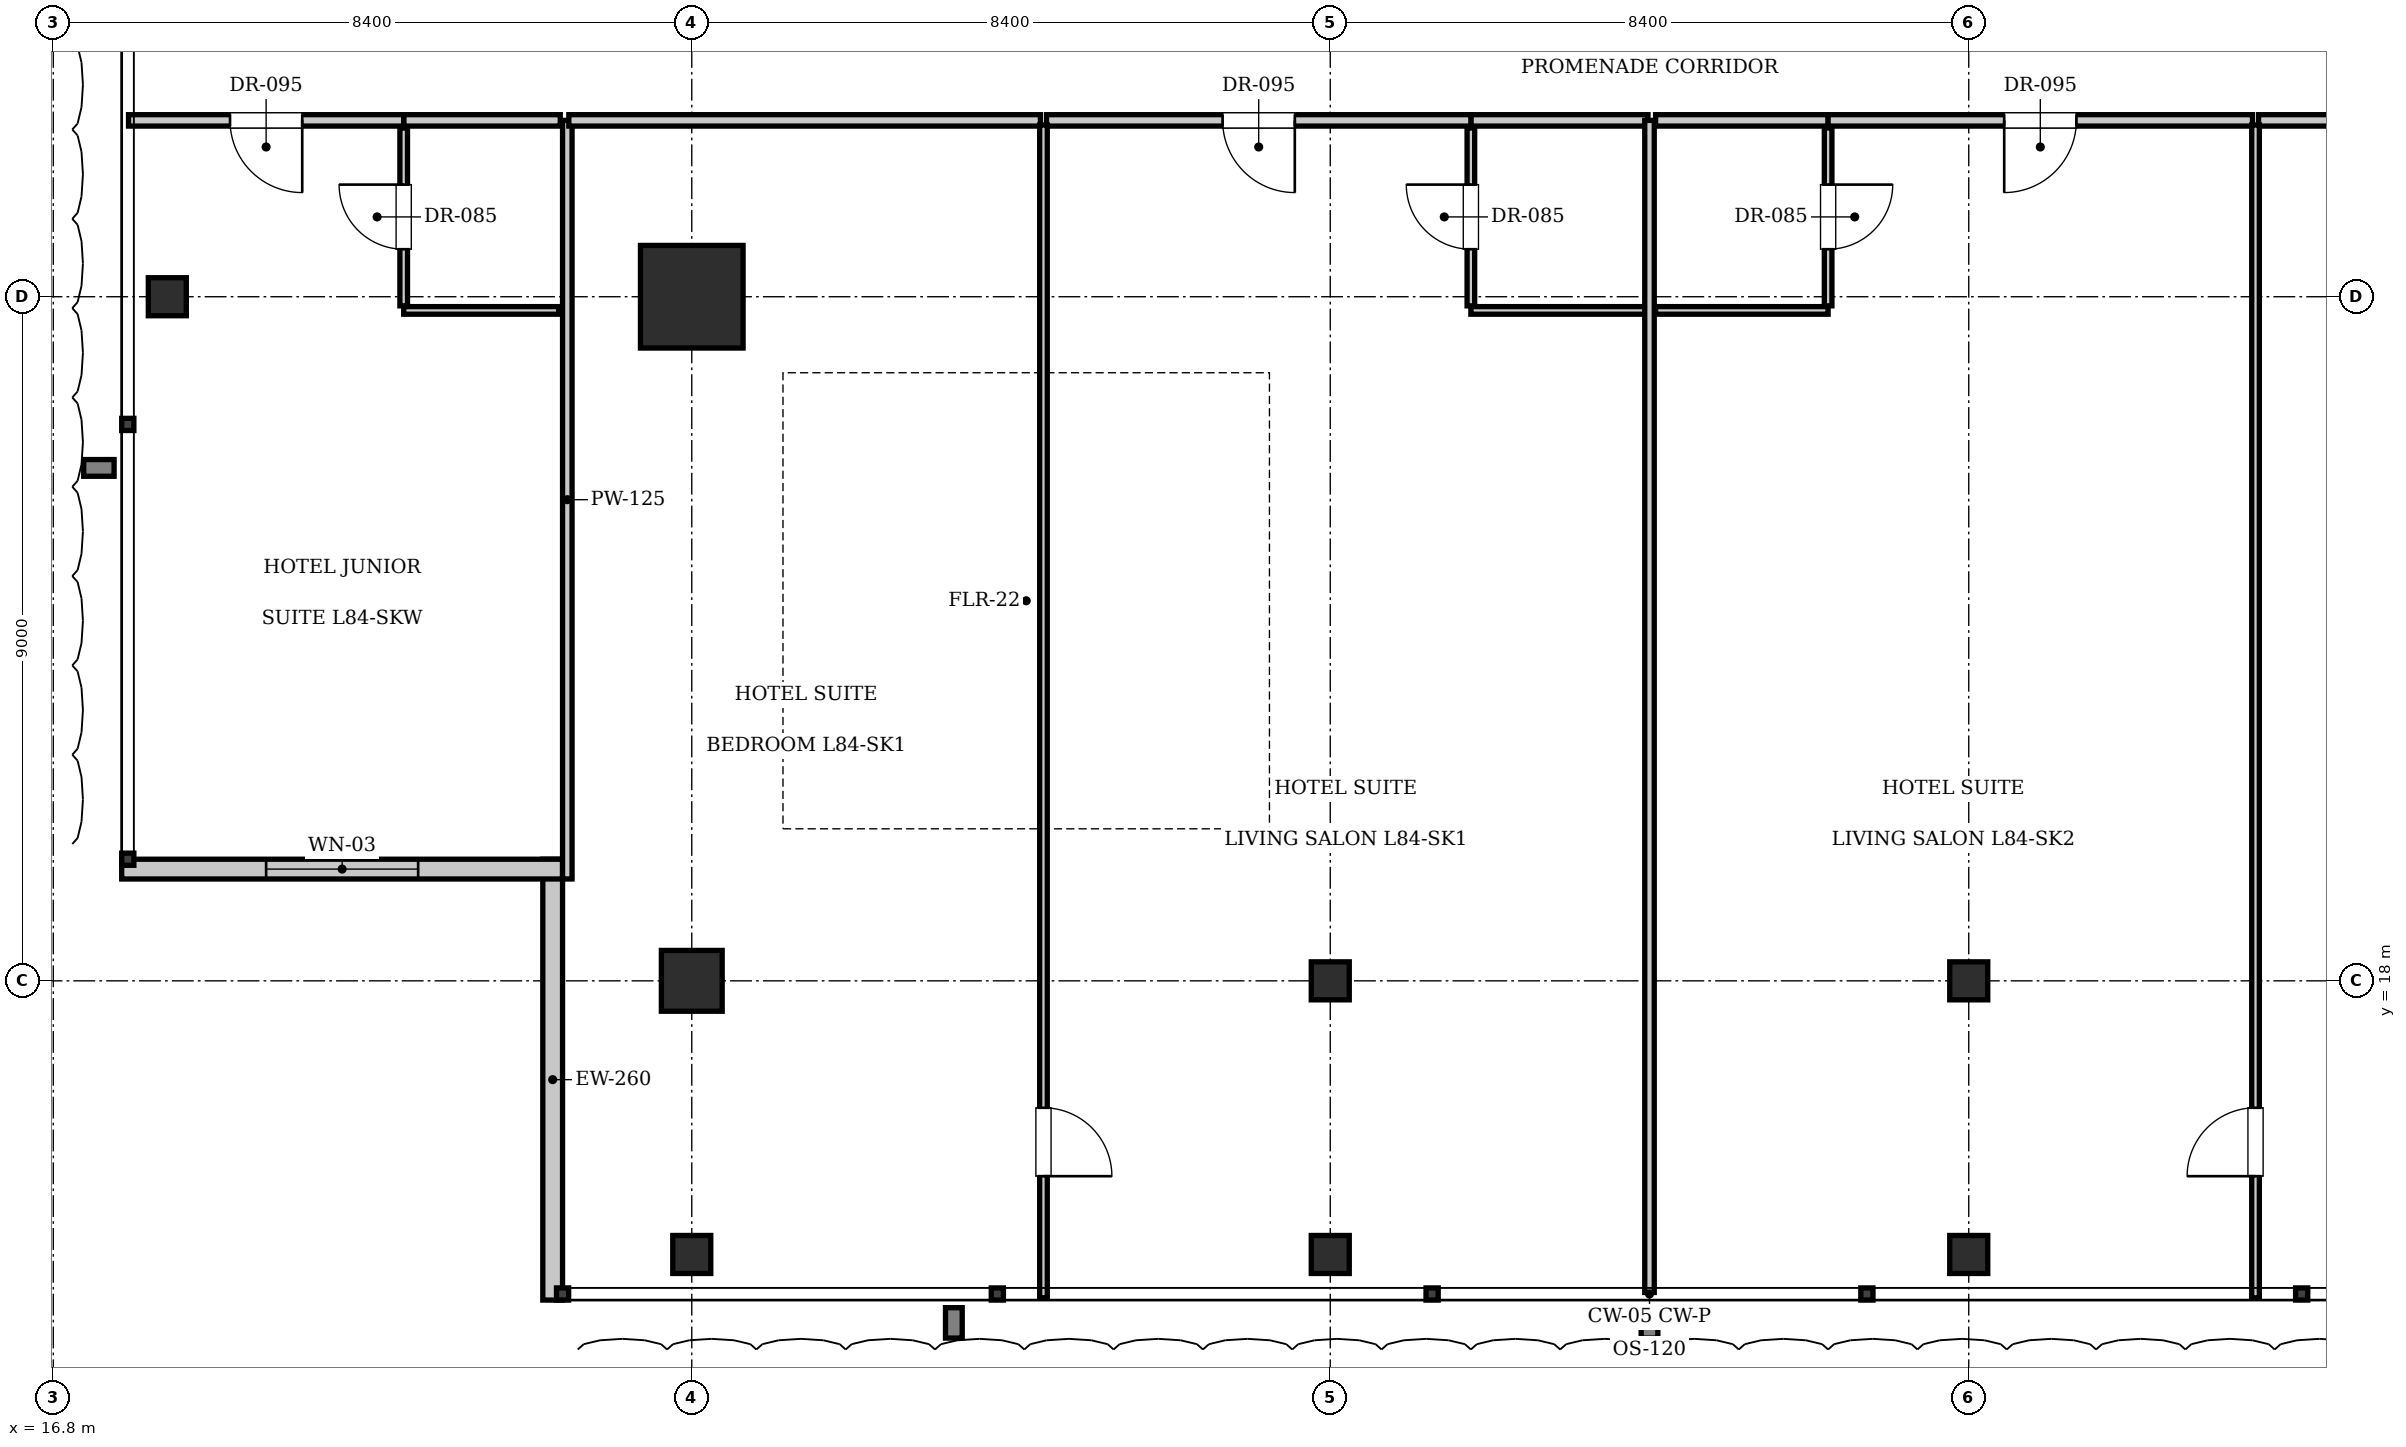
"""IFC4 building model, lengths in metres.
Left out: names, types, materials, properties, quantities, classifications, styles, units other than length and angle.
Written with IfcOpenShell. Run it as: python <this file> out.ifc"""

import sys

from ifc_helpers import new_model, si_unit, direction, frame, frame_2d, origin, origin_2d, place, context, subcontext, project, spatial, rectangle, i_section, extrude, element, fill, save


model = new_model("IFC4")
c1 = context("Model", 3, precision=1e-05, world=origin(), true_north=direction((0.0, 1.0)))
c2 = subcontext(c1, "Body", "Model", "MODEL_VIEW")
j1 = project(units=[si_unit("LENGTHUNIT", "METRE"), si_unit("PLANEANGLEUNIT", "RADIAN")], contexts=[c1])
p1 = place(None, origin())
s1 = spatial("IfcSite", under=j1, at=p1, CompositionType="ELEMENT")
p2 = place(p1, origin())
s2 = spatial("IfcBuilding", under=s1, at=p2, CompositionType="ELEMENT")
p3 = place(p2, frame((0.0, 0.0, 341.25)))
s3 = spatial("IfcBuildingStorey", under=s2, at=p3, CompositionType="ELEMENT", Elevation=341.25)
p4 = place(p3, frame((25.2, 27.0, 0.0), z_axis=(0.0, 0.0, 1.0), x_axis=(1.0, 0.0, 0.0)))
e1 = element("IfcColumn", 1, at=p4, inside=s3, PredefinedType="COLUMN", context=c2, shape_type="SweptSolid", body=[
    extrude(rectangle(XDim=1.35, YDim=1.35, at=origin_2d()), origin(), (0.0, 0.0, 1.0), 3.85),
])
p5 = place(p3, frame((25.2, 18.0, 0.0), z_axis=(0.0, 0.0, 1.0), x_axis=(1.0, 0.0, 0.0)))
e2 = element("IfcColumn", 2, at=p5, inside=s3, PredefinedType="COLUMN", context=c2, shape_type="SweptSolid", body=[
    extrude(rectangle(XDim=0.8, YDim=0.8, at=origin_2d()), origin(), (0.0, 0.0, 1.0), 3.85),
])
for number, where, z_axis, x_axis in (
    (3, (33.6, 18.0, 0.0), (0.0, 0.0, 1.0), (1.0, 0.0, 0.0)),
    (4, (42.0, 18.0, 0.0), (0.0, 0.0, 1.0), (1.0, 0.0, 0.0)),
    (5, (18.3, 27.0, 0.0), (0.0, 0.0, 1.0), (1.0, 0.0, 0.0)),
    (6, (25.2, 14.4, 0.0), (0.0, 0.0, 1.0), (1.0, 0.0, 0.0)),
    (7, (33.6, 14.4, 0.0), (0.0, 0.0, 1.0), (1.0, 0.0, 0.0)),
    (8, (42.0, 14.4, 0.0), (0.0, 0.0, 1.0), (1.0, 0.0, 0.0)),
):
    element("IfcColumn", number, at=place(p3, frame(where, z_axis=z_axis, x_axis=x_axis)), inside=s3, PredefinedType="COLUMN", context=c2, shape_type="SweptSolid", body=[
        extrude(i_section(OverallWidth=0.5, OverallDepth=0.5, WebThickness=0.022, FlangeThickness=0.032, at=origin_2d()), origin(), (0.0, 0.0, 1.0), 3.85),
    ])
p6 = place(p3, frame((23.37, 13.8, 0.0), z_axis=(0.0, 0.0, 1.0), x_axis=(0.0, 1.0, 0.0)))
e9 = element("IfcWall", 9, at=p6, inside=s3, PredefinedType="SOLIDWALL", context=c2, shape_type="SweptSolid", body=[
    extrude(rectangle(XDim=5.8, YDim=0.26, at=frame_2d((2.9, 0.0))), origin(), (0.0, 0.0, 1.0), 3.61),
])
p7 = place(p3, frame((23.5, 19.47, 0.0), z_axis=(0.0, 0.0, 1.0), x_axis=(-1.0, 0.0, 0.0)))
e10 = element("IfcWall", 10, at=p7, inside=s3, PredefinedType="SOLIDWALL", context=c2, shape_type="SweptSolid", body=[
    extrude(rectangle(XDim=5.8, YDim=0.26, at=frame_2d((2.9, 0.0))), origin(), (0.0, 0.0, 1.0), 3.61),
])
p8 = place(p7, frame((1.9, 0.0, 0.9)))
e11 = element("IfcOpeningElement", 11, at=p8, cuts=e10, PredefinedType="OPENING", context=c2, shape_type="SweptSolid", body=[
    extrude(rectangle(XDim=2.0, YDim=2.2, at=frame_2d((1.0, 1.1))), frame((0.0, 0.14, 0.0), z_axis=(0.0, -1.0, 0.0), x_axis=(1.0, 0.0, 0.0)), (0.0, 0.0, 1.0), 0.28),
])
p9 = place(p3, frame((23.562, 19.34, 0.0), z_axis=(0.0, 0.0, 1.0), x_axis=(0.0, 1.0, 0.0)))
e12 = element("IfcWall", 12, at=p9, inside=s3, PredefinedType="PARTITIONING", context=c2, shape_type="SweptSolid", body=[
    extrude(rectangle(XDim=9.98, YDim=0.125, at=frame_2d((4.99, 0.0))), origin(), (0.0, 0.0, 1.0), 3.61),
])
p10 = place(p3, frame((35.45, 29.32, 0.0), z_axis=(0.0, 0.0, 1.0), x_axis=(1.0, 0.0, 0.0)))
e13 = element("IfcWall", 13, at=p10, inside=s3, PredefinedType="PARTITIONING", context=c2, shape_type="SweptSolid", body=[
    extrude(rectangle(XDim=2.33, YDim=0.15, at=frame_2d((1.165, 0.0))), origin(), (0.0, 0.0, 1.0), 3.61),
])
p11 = place(p3, frame((35.45, 26.82, 0.0), z_axis=(0.0, 0.0, 1.0), x_axis=(1.0, 0.0, 0.0)))
e14 = element("IfcWall", 14, at=p11, inside=s3, PredefinedType="PARTITIONING", context=c2, shape_type="SweptSolid", body=[
    extrude(rectangle(XDim=2.31, YDim=0.1, at=frame_2d((1.155, 0.0))), origin(), (0.0, 0.0, 1.0), 2.41),
])
p12 = place(p3, frame((35.45, 26.88, 0.0), z_axis=(0.0, 0.0, 1.0), x_axis=(0.0, 1.0, 0.0)))
e15 = element("IfcWall", 15, at=p12, inside=s3, PredefinedType="PARTITIONING", context=c2, shape_type="SweptSolid", body=[
    extrude(rectangle(XDim=2.34, YDim=0.1, at=frame_2d((1.17, 0.0))), origin(), (0.0, 0.0, 1.0), 3.61),
])
p13 = place(p12, frame((0.745, 0.0, 0.0)))
e16 = element("IfcOpeningElement", 16, at=p13, cuts=e15, PredefinedType="OPENING", context=c2, shape_type="SweptSolid", body=[
    extrude(rectangle(XDim=0.85, YDim=2.1, at=frame_2d((0.425, 1.05))), frame((0.0, 0.06, 0.0), z_axis=(0.0, -1.0, 0.0), x_axis=(1.0, 0.0, 0.0)), (0.0, 0.0, 1.0), 0.12),
])
p14 = place(p3, frame((23.583, 29.32, 0.0), z_axis=(0.0, 0.0, 1.0), x_axis=(1.0, 0.0, 0.0)))
e17 = element("IfcWall", 17, at=p14, inside=s3, PredefinedType="PARTITIONING", context=c2, shape_type="SweptSolid", body=[
    extrude(rectangle(XDim=6.205, YDim=0.15, at=frame_2d((3.102, 0.0))), origin(), (0.0, 0.0, 1.0), 3.61),
])
p15 = place(p3, frame((29.867, 29.32, 0.0), z_axis=(0.0, 0.0, 1.0), x_axis=(1.0, 0.0, 0.0)))
e18 = element("IfcWall", 18, at=p15, inside=s3, PredefinedType="PARTITIONING", context=c2, shape_type="SweptSolid", body=[
    extrude(rectangle(XDim=5.583, YDim=0.15, at=frame_2d((2.792, 0.0))), origin(), (0.0, 0.0, 1.0), 3.61),
])
p16 = place(p15, frame((2.316, 0.0, 0.0)))
e19 = element("IfcOpeningElement", 19, at=p16, cuts=e18, PredefinedType="OPENING", context=c2, shape_type="SweptSolid", body=[
    extrude(rectangle(XDim=0.95, YDim=2.15, at=frame_2d((0.475, 1.075))), frame((0.0, 0.085, 0.0), z_axis=(0.0, -1.0, 0.0), x_axis=(1.0, 0.0, 0.0)), (0.0, 0.0, 1.0), 0.17),
])
p17 = place(p3, frame((29.827, 13.83, 0.0), z_axis=(0.0, 0.0, 1.0), x_axis=(0.0, 1.0, 0.0)))
e20 = element("IfcWall", 20, at=p17, inside=s3, PredefinedType="PARTITIONING", context=c2, shape_type="SweptSolid", body=[
    extrude(rectangle(XDim=15.43, YDim=0.1, at=frame_2d((7.715, 0.0))), origin(), (0.0, 0.0, 1.0), 3.61),
])
p18 = place(p17, frame((1.6, 0.0, 0.0)))
e21 = element("IfcOpeningElement", 21, at=p18, cuts=e20, PredefinedType="OPENING", context=c2, shape_type="SweptSolid", body=[
    extrude(rectangle(XDim=0.9, YDim=2.1, at=frame_2d((0.45, 1.05))), frame((0.0, 0.06, 0.0), z_axis=(0.0, -1.0, 0.0), x_axis=(1.0, 0.0, 0.0)), (0.0, 0.0, 1.0), 0.12),
])
p19 = place(p3, frame((37.8, 13.9, 0.0), z_axis=(0.0, 0.0, 1.0), x_axis=(0.0, 1.0, 0.0)))
e22 = element("IfcWall", 22, at=p19, inside=s3, PredefinedType="PARTITIONING", context=c2, shape_type="SweptSolid", body=[
    extrude(rectangle(XDim=15.42, YDim=0.125, at=frame_2d((7.71, 0.0))), origin(), (0.0, 0.0, 1.0), 3.457),
])
p20 = place(p3, frame((37.88, 29.32, 0.0), z_axis=(0.0, 0.0, 1.0), x_axis=(1.0, 0.0, 0.0)))
e23 = element("IfcWall", 23, at=p20, inside=s3, PredefinedType="PARTITIONING", context=c2, shape_type="SweptSolid", body=[
    extrude(rectangle(XDim=2.27, YDim=0.15, at=frame_2d((1.135, 0.0))), origin(), (0.0, 0.0, 1.0), 3.61),
])
p21 = place(p3, frame((37.88, 26.82, 0.0), z_axis=(0.0, 0.0, 1.0), x_axis=(1.0, 0.0, 0.0)))
e24 = element("IfcWall", 24, at=p21, inside=s3, PredefinedType="PARTITIONING", context=c2, shape_type="SweptSolid", body=[
    extrude(rectangle(XDim=2.27, YDim=0.1, at=frame_2d((1.135, 0.0))), origin(), (0.0, 0.0, 1.0), 2.41),
])
p22 = place(p3, frame((40.15, 26.88, 0.0), z_axis=(0.0, 0.0, 1.0), x_axis=(0.0, 1.0, 0.0)))
e25 = element("IfcWall", 25, at=p22, inside=s3, PredefinedType="PARTITIONING", context=c2, shape_type="SweptSolid", body=[
    extrude(rectangle(XDim=2.34, YDim=0.1, at=frame_2d((1.17, 0.0))), origin(), (0.0, 0.0, 1.0), 3.61),
])
p23 = place(p22, frame((0.745, 0.0, 0.0)))
e26 = element("IfcOpeningElement", 26, at=p23, cuts=e25, PredefinedType="OPENING", context=c2, shape_type="SweptSolid", body=[
    extrude(rectangle(XDim=0.85, YDim=2.1, at=frame_2d((0.425, 1.05))), frame((0.0, 0.06, 0.0), z_axis=(0.0, -1.0, 0.0), x_axis=(1.0, 0.0, 0.0)), (0.0, 0.0, 1.0), 0.12),
])
p24 = place(p3, frame((40.15, 29.32, 0.0), z_axis=(0.0, 0.0, 1.0), x_axis=(1.0, 0.0, 0.0)))
e27 = element("IfcWall", 27, at=p24, inside=s3, PredefinedType="PARTITIONING", context=c2, shape_type="SweptSolid", body=[
    extrude(rectangle(XDim=5.583, YDim=0.15, at=frame_2d((2.792, 0.0))), origin(), (0.0, 0.0, 1.0), 3.61),
])
p25 = place(p24, frame((2.316, 0.0, 0.0)))
e28 = element("IfcOpeningElement", 28, at=p25, cuts=e27, PredefinedType="OPENING", context=c2, shape_type="SweptSolid", body=[
    extrude(rectangle(XDim=0.95, YDim=2.15, at=frame_2d((0.475, 1.075))), frame((0.0, 0.085, 0.0), z_axis=(0.0, -1.0, 0.0), x_axis=(1.0, 0.0, 0.0)), (0.0, 0.0, 1.0), 0.17),
])
p26 = place(p3, frame((45.813, 29.32, 0.0), z_axis=(0.0, 0.0, 1.0), x_axis=(1.0, 0.0, 0.0)))
e29 = element("IfcWall", 29, at=p26, inside=s3, PredefinedType="PARTITIONING", context=c2, shape_type="SweptSolid", body=[
    extrude(rectangle(XDim=6.205, YDim=0.15, at=frame_2d((3.102, 0.0))), origin(), (0.0, 0.0, 1.0), 3.61),
])
p27 = place(p3, frame((45.773, 13.83, 0.0), z_axis=(0.0, 0.0, 1.0), x_axis=(0.0, 1.0, 0.0)))
e30 = element("IfcWall", 30, at=p27, inside=s3, PredefinedType="PARTITIONING", context=c2, shape_type="SweptSolid", body=[
    extrude(rectangle(XDim=15.43, YDim=0.1, at=frame_2d((7.715, 0.0))), origin(), (0.0, 0.0, 1.0), 3.61),
])
p28 = place(p27, frame((1.6, 0.0, 0.0)))
e31 = element("IfcOpeningElement", 31, at=p28, cuts=e30, PredefinedType="OPENING", context=c2, shape_type="SweptSolid", body=[
    extrude(rectangle(XDim=0.9, YDim=2.1, at=frame_2d((0.45, 1.05))), frame((0.0, 0.06, 0.0), z_axis=(0.0, -1.0, 0.0), x_axis=(1.0, 0.0, 0.0)), (0.0, 0.0, 1.0), 0.12),
])
p29 = place(p3, frame((21.41, 29.32, 0.0), z_axis=(0.0, 0.0, 1.0), x_axis=(1.0, 0.0, 0.0)))
e32 = element("IfcWall", 32, at=p29, inside=s3, PredefinedType="PARTITIONING", context=c2, shape_type="SweptSolid", body=[
    extrude(rectangle(XDim=2.06, YDim=0.15, at=frame_2d((1.03, 0.0))), origin(), (0.0, 0.0, 1.0), 3.61),
])
p30 = place(p3, frame((21.41, 26.82, 0.0), z_axis=(0.0, 0.0, 1.0), x_axis=(1.0, 0.0, 0.0)))
e33 = element("IfcWall", 33, at=p30, inside=s3, PredefinedType="PARTITIONING", context=c2, shape_type="SweptSolid", body=[
    extrude(rectangle(XDim=2.04, YDim=0.1, at=frame_2d((1.02, 0.0))), origin(), (0.0, 0.0, 1.0), 3.61),
])
p31 = place(p3, frame((21.41, 26.88, 0.0), z_axis=(0.0, 0.0, 1.0), x_axis=(0.0, 1.0, 0.0)))
e34 = element("IfcWall", 34, at=p31, inside=s3, PredefinedType="PARTITIONING", context=c2, shape_type="SweptSolid", body=[
    extrude(rectangle(XDim=2.34, YDim=0.1, at=frame_2d((1.17, 0.0))), origin(), (0.0, 0.0, 1.0), 3.61),
])
p32 = place(p31, frame((0.745, 0.0, 0.0)))
e35 = element("IfcOpeningElement", 35, at=p32, cuts=e34, PredefinedType="OPENING", context=c2, shape_type="SweptSolid", body=[
    extrude(rectangle(XDim=0.85, YDim=2.1, at=frame_2d((0.425, 1.05))), frame((0.0, 0.06, 0.0), z_axis=(0.0, -1.0, 0.0), x_axis=(1.0, 0.0, 0.0)), (0.0, 0.0, 1.0), 0.12),
])
p33 = place(p3, frame((17.79, 29.32, 0.0), z_axis=(0.0, 0.0, 1.0), x_axis=(1.0, 0.0, 0.0)))
e36 = element("IfcWall", 36, at=p33, inside=s3, PredefinedType="PARTITIONING", context=c2, shape_type="SweptSolid", body=[
    extrude(rectangle(XDim=3.62, YDim=0.15, at=frame_2d((1.81, 0.0))), origin(), (0.0, 0.0, 1.0), 3.61),
])
p34 = place(p33, frame((1.335, 0.0, 0.0)))
e37 = element("IfcOpeningElement", 37, at=p34, cuts=e36, PredefinedType="OPENING", context=c2, shape_type="SweptSolid", body=[
    extrude(rectangle(XDim=0.95, YDim=2.15, at=frame_2d((0.475, 1.075))), frame((0.0, 0.085, 0.0), z_axis=(0.0, -1.0, 0.0), x_axis=(1.0, 0.0, 0.0)), (0.0, 0.0, 1.0), 0.17),
])
p35 = place(p8, origin())
e38 = element("IfcWindow", 38, at=p35, inside=s3, PartitioningType="SINGLE_PANEL", PredefinedType="WINDOW", context=c2, shape_type="SweptSolid", body=[
    extrude(rectangle(XDim=2.0, YDim=2.2, at=frame_2d((1.0, 1.1))), frame((0.0, 0.03, 0.0), z_axis=(0.0, -1.0, 0.0), x_axis=(1.0, 0.0, 0.0)), (0.0, 0.0, 1.0), 0.06),
])
fill(e11, e38)
p36 = place(p13, origin())
e39 = element("IfcDoor", 39, at=p36, inside=s3, OperationType="SINGLE_SWING_RIGHT", PredefinedType="DOOR", context=c2, shape_type="SweptSolid", body=[
    extrude(rectangle(XDim=0.85, YDim=2.1, at=frame_2d((0.425, 1.05))), frame((0.0, 0.025, 0.0), z_axis=(0.0, -1.0, 0.0), x_axis=(1.0, 0.0, 0.0)), (0.0, 0.0, 1.0), 0.05),
])
fill(e16, e39)
p37 = place(p16, frame((0.95, 0.0, 0.0), z_axis=(0.0, 0.0, 1.0), x_axis=(-1.0, 0.0, 0.0)))
e40 = element("IfcDoor", 40, at=p37, inside=s3, OperationType="SINGLE_SWING_LEFT", PredefinedType="DOOR", context=c2, shape_type="SweptSolid", body=[
    extrude(rectangle(XDim=0.95, YDim=2.15, at=frame_2d((0.475, 1.075))), frame((0.0, 0.025, 0.0), z_axis=(0.0, -1.0, 0.0), x_axis=(1.0, 0.0, 0.0)), (0.0, 0.0, 1.0), 0.05),
])
fill(e19, e40)
p38 = place(p18, frame((0.9, 0.0, 0.0), z_axis=(0.0, 0.0, 1.0), x_axis=(-1.0, 0.0, 0.0)))
e41 = element("IfcDoor", 41, at=p38, inside=s3, OperationType="SINGLE_SWING_RIGHT", PredefinedType="DOOR", context=c2, shape_type="SweptSolid", body=[
    extrude(rectangle(XDim=0.9, YDim=2.1, at=frame_2d((0.45, 1.05))), frame((0.0, 0.025, 0.0), z_axis=(0.0, -1.0, 0.0), x_axis=(1.0, 0.0, 0.0)), (0.0, 0.0, 1.0), 0.05),
])
fill(e21, e41)
p39 = place(p23, frame((0.85, 0.0, 0.0), z_axis=(0.0, 0.0, 1.0), x_axis=(-1.0, 0.0, 0.0)))
e42 = element("IfcDoor", 42, at=p39, inside=s3, OperationType="SINGLE_SWING_LEFT", PredefinedType="DOOR", context=c2, shape_type="SweptSolid", body=[
    extrude(rectangle(XDim=0.85, YDim=2.1, at=frame_2d((0.425, 1.05))), frame((0.0, 0.025, 0.0), z_axis=(0.0, -1.0, 0.0), x_axis=(1.0, 0.0, 0.0)), (0.0, 0.0, 1.0), 0.05),
])
fill(e26, e42)
p40 = place(p25, frame((0.95, 0.0, 0.0), z_axis=(0.0, 0.0, 1.0), x_axis=(-1.0, 0.0, 0.0)))
e43 = element("IfcDoor", 43, at=p40, inside=s3, OperationType="SINGLE_SWING_RIGHT", PredefinedType="DOOR", context=c2, shape_type="SweptSolid", body=[
    extrude(rectangle(XDim=0.95, YDim=2.15, at=frame_2d((0.475, 1.075))), frame((0.0, 0.025, 0.0), z_axis=(0.0, -1.0, 0.0), x_axis=(1.0, 0.0, 0.0)), (0.0, 0.0, 1.0), 0.05),
])
fill(e28, e43)
p41 = place(p28, origin())
e44 = element("IfcDoor", 44, at=p41, inside=s3, OperationType="SINGLE_SWING_LEFT", PredefinedType="DOOR", context=c2, shape_type="SweptSolid", body=[
    extrude(rectangle(XDim=0.9, YDim=2.1, at=frame_2d((0.45, 1.05))), frame((0.0, 0.025, 0.0), z_axis=(0.0, -1.0, 0.0), x_axis=(1.0, 0.0, 0.0)), (0.0, 0.0, 1.0), 0.05),
])
fill(e31, e44)
p42 = place(p32, origin())
e45 = element("IfcDoor", 45, at=p42, inside=s3, OperationType="SINGLE_SWING_RIGHT", PredefinedType="DOOR", context=c2, shape_type="SweptSolid", body=[
    extrude(rectangle(XDim=0.85, YDim=2.1, at=frame_2d((0.425, 1.05))), frame((0.0, 0.025, 0.0), z_axis=(0.0, -1.0, 0.0), x_axis=(1.0, 0.0, 0.0)), (0.0, 0.0, 1.0), 0.05),
])
fill(e35, e45)
p43 = place(p34, frame((0.95, 0.0, 0.0), z_axis=(0.0, 0.0, 1.0), x_axis=(-1.0, 0.0, 0.0)))
e46 = element("IfcDoor", 46, at=p43, inside=s3, OperationType="SINGLE_SWING_LEFT", PredefinedType="DOOR", context=c2, shape_type="SweptSolid", body=[
    extrude(rectangle(XDim=0.95, YDim=2.15, at=frame_2d((0.475, 1.075))), frame((0.0, 0.025, 0.0), z_axis=(0.0, -1.0, 0.0), x_axis=(1.0, 0.0, 0.0)), (0.0, 0.0, 1.0), 0.05),
])
fill(e37, e46)
save(model, sys.argv[1])
